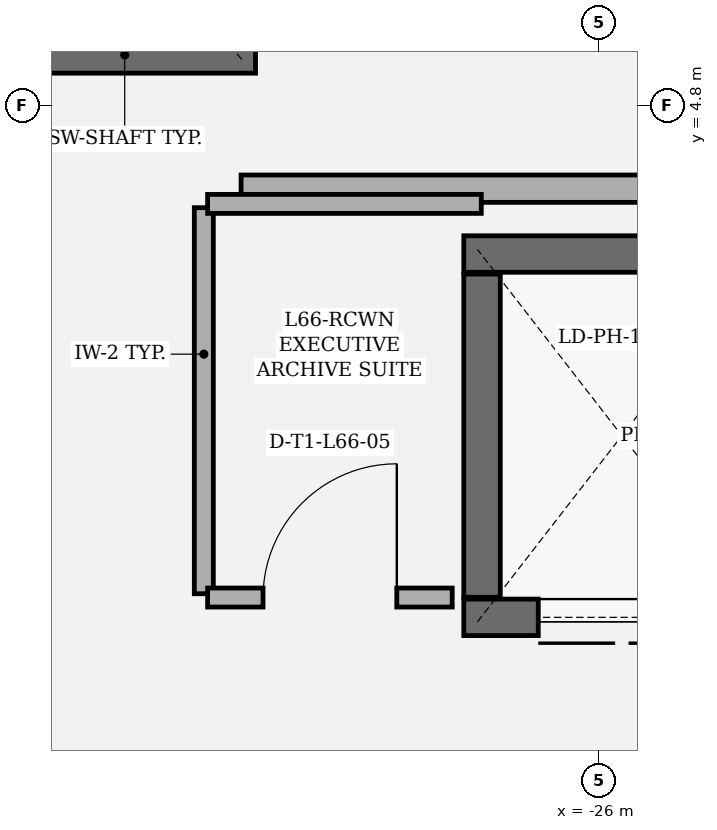
"""IFC4 building model, lengths in metres.
Left out: names, types, materials, properties, quantities, classifications, styles, units other than length and angle.
Written with IfcOpenShell. Run it as: python <this file> out.ifc"""

import sys

from ifc_helpers import new_model, si_unit, direction, frame, frame_2d, origin, place, context, subcontext, project, spatial, rectangle, extrude, element, fill, save


model = new_model("IFC4")
c1 = context("Model", 3, precision=1e-05, world=origin(), true_north=direction((0.0, 1.0)))
c2 = subcontext(c1, "Body", "Model", "MODEL_VIEW")
j1 = project(units=[si_unit("LENGTHUNIT", "METRE"), si_unit("PLANEANGLEUNIT", "RADIAN")], contexts=[c1])
p1 = place(None, origin())
s1 = spatial("IfcSite", under=j1, at=p1, CompositionType="ELEMENT")
p2 = place(p1, origin())
s2 = spatial("IfcBuilding", under=s1, at=p2, CompositionType="ELEMENT")
p3 = place(p2, frame((0.0, 0.0, 285.0)))
s3 = spatial("IfcBuildingStorey", under=s2, at=p3, CompositionType="ELEMENT", Elevation=285.0)
p4 = place(p3, frame((-28.26, 5.13, 0.0), z_axis=(0.0, 0.0, 1.0), x_axis=(-1.0, 0.0, 0.0)))
e1 = element("IfcWall", 1, at=p4, inside=s3, PredefinedType="SHEAR", context=c2, shape_type="SweptSolid", body=[
    extrude(rectangle(XDim=2.48, YDim=0.24, at=frame_2d((1.24, 0.0))), origin(), (0.0, 0.0, 1.0), 3.91),
])
p5 = place(p3, frame((-24.81, 1.43, 0.0), z_axis=(0.0, 0.0, 1.0), x_axis=(-1.0, 0.0, 0.0)))
e2 = element("IfcWall", 2, at=p5, inside=s3, PredefinedType="SHEAR", context=c2, shape_type="SweptSolid", body=[
    extrude(rectangle(XDim=2.08, YDim=0.24, at=frame_2d((1.04, 0.0))), origin(), (0.0, 0.0, 1.0), 3.91),
])
p6 = place(p5, frame((0.49, 0.0, 0.0)))
e3 = element("IfcOpeningElement", 3, at=p6, cuts=e2, PredefinedType="OPENING", context=c2, shape_type="SweptSolid", body=[
    extrude(rectangle(XDim=1.1, YDim=2.2, at=frame_2d((0.55, 1.1))), frame((0.0, 0.13, 0.0), z_axis=(0.0, -1.0, 0.0), x_axis=(1.0, 0.0, 0.0)), (0.0, 0.0, 1.0), 0.26),
])
p7 = place(p3, frame((-26.89, 3.82, 0.0), z_axis=(0.0, 0.0, 1.0), x_axis=(1.0, 0.0, 0.0)))
e4 = element("IfcWall", 4, at=p7, inside=s3, PredefinedType="SHEAR", context=c2, shape_type="SweptSolid", body=[
    extrude(rectangle(XDim=2.08, YDim=0.24, at=frame_2d((1.04, 0.0))), origin(), (0.0, 0.0, 1.0), 3.91),
])
p8 = place(p3, frame((-26.77, 1.562, 0.0), z_axis=(0.0, 0.0, 1.0), x_axis=(0.0, 1.0, 0.0)))
e5 = element("IfcWall", 5, at=p8, inside=s3, PredefinedType="SHEAR", context=c2, shape_type="SweptSolid", body=[
    extrude(rectangle(XDim=2.126, YDim=0.24, at=frame_2d((1.063, 0.0))), origin(), (0.0, 0.0, 1.0), 3.91),
])
p9 = place(p3, frame((-28.355, 4.25, 0.0), z_axis=(0.0, 0.0, 1.0), x_axis=(1.0, 0.0, 0.0)))
e6 = element("IfcWall", 6, at=p9, inside=s3, PredefinedType="PARTITIONING", context=c2, shape_type="SweptSolid", body=[
    extrude(rectangle(XDim=3.622, YDim=0.18, at=frame_2d((1.811, 0.0))), origin(), (0.0, 0.0, 1.0), 3.91),
])
p10 = place(p3, frame((-28.6, 4.125, 0.0), z_axis=(0.0, 0.0, 1.0), x_axis=(0.0, -1.0, 0.0)))
e7 = element("IfcWall", 7, at=p10, inside=s3, PredefinedType="PARTITIONING", context=c2, shape_type="SweptSolid", body=[
    extrude(rectangle(XDim=2.54, YDim=0.125, at=frame_2d((1.27, 0.0))), origin(), (0.0, 0.0, 1.0), 3.91),
])
p11 = place(p3, frame((-28.575, 1.56, 0.0), z_axis=(0.0, 0.0, 1.0), x_axis=(1.0, 0.0, 0.0)))
e8 = element("IfcWall", 8, at=p11, inside=s3, PredefinedType="PARTITIONING", context=c2, shape_type="SweptSolid", body=[
    extrude(rectangle(XDim=1.609, YDim=0.125, at=frame_2d((0.805, 0.0))), origin(), (0.0, 0.0, 1.0), 3.91),
])
p12 = place(p11, frame((0.365, 0.0, 0.0)))
e9 = element("IfcOpeningElement", 9, at=p12, cuts=e8, PredefinedType="OPENING", context=c2, shape_type="SweptSolid", body=[
    extrude(rectangle(XDim=0.88, YDim=2.1, at=frame_2d((0.44, 1.05))), frame((0.0, 0.073, 0.0), z_axis=(0.0, -1.0, 0.0), x_axis=(1.0, 0.0, 0.0)), (0.0, 0.0, 1.0), 0.145),
])
p13 = place(p3, frame((-26.775, 4.15, 0.0), z_axis=(0.0, 0.0, 1.0), x_axis=(-1.0, 0.0, 0.0)))
e10 = element("IfcWall", 10, at=p13, inside=s3, PredefinedType="PARTITIONING", context=c2, shape_type="SweptSolid", body=[
    extrude(rectangle(XDim=1.8, YDim=0.125, at=frame_2d((0.9, 0.0))), origin(), (0.0, 0.0, 1.0), 3.91),
])
p14 = place(p6, origin())
e11 = element("IfcDoor", 11, at=p14, inside=s3, OperationType="DOUBLE_DOOR_SLIDING", PredefinedType="DOOR", context=c2, shape_type="SweptSolid", body=[
    extrude(rectangle(XDim=1.1, YDim=2.2, at=frame_2d((0.55, 1.1))), frame((0.0, 0.025, 0.0), z_axis=(0.0, -1.0, 0.0), x_axis=(1.0, 0.0, 0.0)), (0.0, 0.0, 1.0), 0.05),
])
fill(e3, e11)
p15 = place(p12, origin())
e12 = element("IfcDoor", 12, at=p15, inside=s3, OperationType="SINGLE_SWING_RIGHT", PredefinedType="DOOR", context=c2, shape_type="SweptSolid", body=[
    extrude(rectangle(XDim=0.88, YDim=2.1, at=frame_2d((0.44, 1.05))), frame((0.0, 0.025, 0.0), z_axis=(0.0, -1.0, 0.0), x_axis=(1.0, 0.0, 0.0)), (0.0, 0.0, 1.0), 0.05),
])
fill(e9, e12)
save(model, sys.argv[1])
